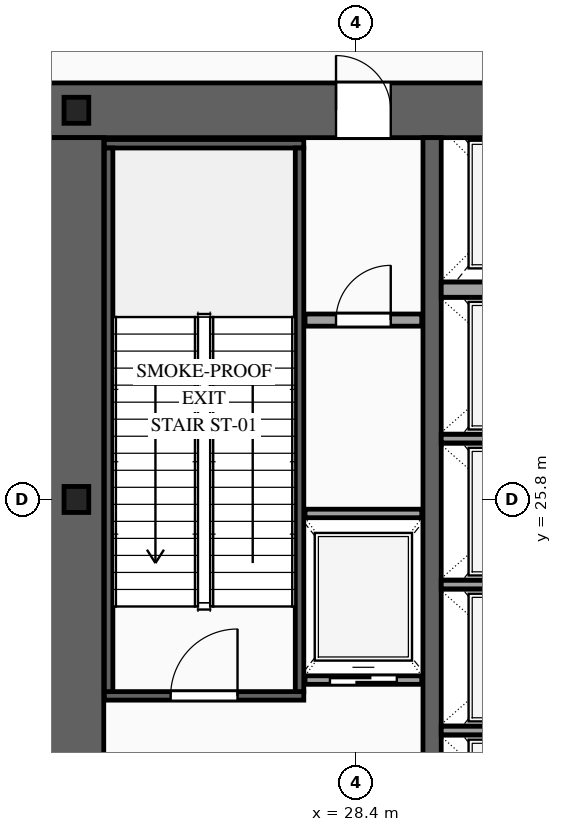
"""IFC4 building model, lengths in metres.
Left out: names, types, materials, properties, quantities, classifications, styles, units other than length and angle.
Written with IfcOpenShell. Run it as: python <this file> out.ifc"""

import sys

from ifc_helpers import new_model, si_unit, direction, frame, frame_2d, origin, origin_2d, place, context, subcontext, project, spatial, rectangle, i_section, extrude, source, transform, mapped, element, fill, save


model = new_model("IFC4")
c1 = context("Model", 3, precision=1e-05, world=origin(), true_north=direction((0.0, 1.0)))
c2 = subcontext(c1, "Body", "Model", "MODEL_VIEW")
j1 = project(units=[si_unit("LENGTHUNIT", "METRE"), si_unit("PLANEANGLEUNIT", "RADIAN")], contexts=[c1])
p1 = place(None, origin())
s1 = spatial("IfcSite", under=j1, at=p1, CompositionType="ELEMENT")
p2 = place(p1, origin())
s2 = spatial("IfcBuilding", under=s1, at=p2, CompositionType="ELEMENT")
p3 = place(p2, frame((0.0, 0.0, 19.8)))
s3 = spatial("IfcBuildingStorey", under=s2, at=p3, CompositionType="ELEMENT", Elevation=19.8)
p4 = place(p3, frame((23.35, 32.2, 0.0), z_axis=(0.0, 0.0, 1.0), x_axis=(1.0, 0.0, 0.0)))
e1 = element("IfcWall", 1, at=p4, inside=s3, PredefinedType="SHEAR", context=c2, shape_type="SweptSolid", body=[
    extrude(rectangle(XDim=27.3, YDim=0.9, at=frame_2d((13.65, 0.0))), origin(), (0.0, 0.0, 1.0), 6.0),
])
p5 = place(p4, frame((4.72, 0.0, 0.0)))
e2 = element("IfcOpeningElement", 2, at=p5, cuts=e1, PredefinedType="OPENING", context=c2, shape_type="SweptSolid", body=[
    extrude(rectangle(XDim=0.9, YDim=2.15, at=frame_2d((0.45, 1.075))), frame((0.0, 0.465, 0.0), z_axis=(0.0, -1.0, 0.0), x_axis=(1.0, 0.0, 0.0)), (0.0, 0.0, 1.0), 0.93),
])
p6 = place(p4, frame((10.0, 0.0, 0.0)))
e3 = element("IfcOpeningElement", 3, at=p6, cuts=e1, PredefinedType="OPENING", context=c2, shape_type="SweptSolid", body=[
    extrude(rectangle(XDim=1.1, YDim=2.2, at=frame_2d((0.55, 1.1))), frame((0.0, 0.465, 0.0), z_axis=(0.0, -1.0, 0.0), x_axis=(1.0, 0.0, 0.0)), (0.0, 0.0, 1.0), 0.93),
])
p7 = place(p4, frame((15.85, 0.0, 0.0)))
e4 = element("IfcOpeningElement", 4, at=p7, cuts=e1, PredefinedType="OPENING", context=c2, shape_type="SweptSolid", body=[
    extrude(rectangle(XDim=1.1, YDim=2.2, at=frame_2d((0.55, 1.1))), frame((0.0, 0.465, 0.0), z_axis=(0.0, -1.0, 0.0), x_axis=(1.0, 0.0, 0.0)), (0.0, 0.0, 1.0), 0.93),
])
p8 = place(p4, frame((19.82, 0.0, 0.0)))
e5 = element("IfcOpeningElement", 5, at=p8, cuts=e1, PredefinedType="OPENING", context=c2, shape_type="SweptSolid", body=[
    extrude(rectangle(XDim=0.9, YDim=2.15, at=frame_2d((0.45, 1.075))), frame((0.0, 0.465, 0.0), z_axis=(0.0, -1.0, 0.0), x_axis=(1.0, 0.0, 0.0)), (0.0, 0.0, 1.0), 0.93),
])
m1 = source(origin(), c2, "Body", "SweptSolid", [
    extrude(rectangle(XDim=11.9, YDim=0.9, at=frame_2d((5.95, 0.0))), origin(), (0.0, 0.0, 1.0), 6.0),
])
p9 = place(p3, frame((23.8, 19.85, 0.0), z_axis=(0.0, 0.0, 1.0), x_axis=(0.0, 1.0, 0.0)))
e6 = element("IfcWall", 6, at=p9, inside=s3, PredefinedType="SHEAR", context=c2, shape_type="MappedRepresentation", body=[
    mapped(m1, transform((0.0, 0.0, 0.0), scale=1.0)),
])
m2 = source(origin(), c2, "Body", "SweptSolid", [
    extrude(rectangle(XDim=11.9, YDim=0.3, at=frame_2d((5.95, 0.0))), origin(), (0.0, 0.0, 1.0), 6.0),
])
p10 = place(p3, frame((29.65, 19.85, 0.0), z_axis=(0.0, 0.0, 1.0), x_axis=(0.0, 1.0, 0.0)))
e7 = element("IfcWall", 7, at=p10, inside=s3, PredefinedType="SOLIDWALL", context=c2, shape_type="MappedRepresentation", body=[
    mapped(m2, transform((0.0, 0.0, 0.0), scale=1.0)),
])
m3 = source(origin(), c2, "Body", "SweptSolid", [
    extrude(i_section(OverallWidth=0.407, OverallDepth=0.428, WebThickness=0.02, FlangeThickness=0.035, at=origin_2d()), origin(), (0.0, 0.0, 1.0), 6.0),
])
for number, where, z_axis, x_axis in (
    (8, (23.8, 25.8, 0.0), (0.0, 0.0, 1.0), (1.0, 0.0, 0.0)),
    (9, (23.8, 32.2, 0.0), (0.0, 0.0, 1.0), (1.0, 0.0, 0.0)),
):
    element("IfcColumn", number, at=place(p3, frame(where, z_axis=z_axis, x_axis=x_axis)), inside=s3, PredefinedType="COLUMN", context=c2, shape_type="MappedRepresentation", body=[
        mapped(m3, transform((0.0, 0.0, 0.0), scale=1.0)),
    ])
p11 = place(p3, frame((27.56, 22.83, 0.0), z_axis=(0.0, 0.0, 1.0), x_axis=(1.0, 0.0, 0.0)))
e10 = element("IfcWall", 10, at=p11, inside=s3, PredefinedType="SOLIDWALL", context=c2, shape_type="SweptSolid", body=[
    extrude(rectangle(XDim=1.92, YDim=0.14, at=frame_2d((0.96, 0.0))), origin(), (0.0, 0.0, 1.0), 5.68),
])
p12 = place(p11, frame((0.41, 0.0, 0.0)))
e11 = element("IfcOpeningElement", 11, at=p12, cuts=e10, PredefinedType="OPENING", context=c2, shape_type="SweptSolid", body=[
    extrude(rectangle(XDim=1.1, YDim=2.2, at=frame_2d((0.55, 1.1))), frame((0.0, 0.085, 0.0), z_axis=(0.0, -1.0, 0.0), x_axis=(1.0, 0.0, 0.0)), (0.0, 0.0, 1.0), 0.17),
])
m4 = source(origin(), c2, "Body", "SweptSolid", [
    extrude(rectangle(XDim=1.92, YDim=0.14, at=frame_2d((0.96, 0.0))), origin(), (0.0, 0.0, 1.0), 5.68),
])
p13 = place(p3, frame((27.56, 25.57, 0.0), z_axis=(0.0, 0.0, 1.0), x_axis=(1.0, 0.0, 0.0)))
e12 = element("IfcWall", 12, at=p13, inside=s3, PredefinedType="SOLIDWALL", context=c2, shape_type="MappedRepresentation", body=[
    mapped(m4, transform((0.0, 0.0, 0.0), scale=1.0)),
])
m5 = source(origin(), c2, "Body", "SweptSolid", [
    extrude(rectangle(XDim=2.5, YDim=0.14, at=frame_2d((1.25, 0.0))), origin(), (0.0, 0.0, 1.0), 5.68),
])
for number, where, z_axis, x_axis in (
    (13, (29.8, 22.0, 0.0), (0.0, 0.0, 1.0), (1.0, 0.0, 0.0)),
    (14, (29.8, 24.4, 0.0), (0.0, 0.0, 1.0), (1.0, 0.0, 0.0)),
    (15, (29.8, 26.8, 0.0), (0.0, 0.0, 1.0), (1.0, 0.0, 0.0)),
):
    element("IfcWall", number, at=place(p3, frame(where, z_axis=z_axis, x_axis=x_axis)), inside=s3, PredefinedType="SOLIDWALL", context=c2, shape_type="MappedRepresentation", body=[
        mapped(m5, transform((0.0, 0.0, 0.0), scale=1.0)),
    ])
m6 = source(origin(), c2, "Body", "SweptSolid", [
    extrude(rectangle(XDim=2.5, YDim=0.25, at=frame_2d((1.25, 0.0))), origin(), (0.0, 0.0, 1.0), 5.68),
])
p14 = place(p3, frame((29.8, 29.25, 0.0), z_axis=(0.0, 0.0, 1.0), x_axis=(1.0, 0.0, 0.0)))
e16 = element("IfcWall", 16, at=p14, inside=s3, PredefinedType="SOLIDWALL", context=c2, shape_type="MappedRepresentation", body=[
    mapped(m6, transform((0.0, 0.0, 0.0), scale=1.0)),
])
p15 = place(p3, frame((24.26, 22.57, 0.0), z_axis=(0.0, 0.0, 1.0), x_axis=(1.0, 0.0, 0.0)))
e17 = element("IfcWall", 17, at=p15, inside=s3, PredefinedType="SOLIDWALL", context=c2, shape_type="SweptSolid", body=[
    extrude(rectangle(XDim=3.28, YDim=0.14, at=frame_2d((1.64, 0.0))), origin(), (0.0, 0.0, 1.0), 5.68),
])
p16 = place(p15, frame((1.09, 0.0, 0.0)))
e18 = element("IfcOpeningElement", 18, at=p16, cuts=e17, PredefinedType="OPENING", context=c2, shape_type="SweptSolid", body=[
    extrude(rectangle(XDim=1.1, YDim=2.2, at=frame_2d((0.55, 1.1))), frame((0.0, 0.085, 0.0), z_axis=(0.0, -1.0, 0.0), x_axis=(1.0, 0.0, 0.0)), (0.0, 0.0, 1.0), 0.17),
])
m7 = source(origin(), c2, "Body", "SweptSolid", [
    extrude(rectangle(XDim=3.28, YDim=0.14, at=frame_2d((1.64, 0.0))), origin(), (0.0, 0.0, 1.0), 5.68),
])
p17 = place(p3, frame((24.26, 31.65, 0.0), z_axis=(0.0, 0.0, 1.0), x_axis=(1.0, 0.0, 0.0)))
e19 = element("IfcWall", 19, at=p17, inside=s3, PredefinedType="SOLIDWALL", context=c2, shape_type="MappedRepresentation", body=[
    mapped(m7, transform((0.0, 0.0, 0.0), scale=1.0)),
])
m8 = source(origin(), c2, "Body", "SweptSolid", [
    extrude(rectangle(XDim=8.94, YDim=0.14, at=frame_2d((4.47, 0.0))), origin(), (0.0, 0.0, 1.0), 5.68),
])
for number, where, z_axis, x_axis in (
    (20, (24.33, 22.64, 0.0), (0.0, 0.0, 1.0), (0.0, 1.0, 0.0)),
    (21, (27.47, 22.64, 0.0), (0.0, 0.0, 1.0), (0.0, 1.0, 0.0)),
):
    element("IfcWall", number, at=place(p3, frame(where, z_axis=z_axis, x_axis=x_axis)), inside=s3, PredefinedType="SOLIDWALL", context=c2, shape_type="MappedRepresentation", body=[
        mapped(m8, transform((0.0, 0.0, 0.0), scale=1.0)),
    ])
p18 = place(p3, frame((27.56, 28.75, 0.0), z_axis=(0.0, 0.0, 1.0), x_axis=(1.0, 0.0, 0.0)))
e22 = element("IfcWall", 22, at=p18, inside=s3, PredefinedType="PARTITIONING", context=c2, shape_type="SweptSolid", body=[
    extrude(rectangle(XDim=1.92, YDim=0.2, at=frame_2d((0.96, 0.0))), origin(), (0.0, 0.0, 1.0), 5.68),
])
p19 = place(p18, frame((0.51, 0.0, 0.0)))
e23 = element("IfcOpeningElement", 23, at=p19, cuts=e22, PredefinedType="OPENING", context=c2, shape_type="SweptSolid", body=[
    extrude(rectangle(XDim=0.9, YDim=2.15, at=frame_2d((0.45, 1.075))), frame((0.0, 0.115, 0.0), z_axis=(0.0, -1.0, 0.0), x_axis=(1.0, 0.0, 0.0)), (0.0, 0.0, 1.0), 0.23),
])
m9 = source(origin(), c2, "Body", "SweptSolid", [
    extrude(rectangle(XDim=1.1, YDim=2.2, at=frame_2d((0.55, 1.1))), frame((0.0, 0.025, 0.0), z_axis=(0.0, -1.0, 0.0), x_axis=(1.0, 0.0, 0.0)), (0.0, 0.0, 1.0), 0.05),
])
p20 = place(p12, origin())
e24 = element("IfcDoor", 24, at=p20, inside=s3, OperationType="SLIDING_TO_LEFT", PredefinedType="DOOR", context=c2, shape_type="MappedRepresentation", body=[
    mapped(m9, transform((0.0, 0.0, 0.0), scale=1.0)),
])
fill(e11, e24)
m10 = source(origin(), c2, "Body", "SweptSolid", [
    extrude(rectangle(XDim=1.1, YDim=2.2, at=frame_2d((0.55, 1.1))), frame((0.0, 0.025, 0.0), z_axis=(0.0, -1.0, 0.0), x_axis=(1.0, 0.0, 0.0)), (0.0, 0.0, 1.0), 0.05),
])
p21 = place(p16, origin())
e25 = element("IfcDoor", 25, at=p21, inside=s3, OperationType="SINGLE_SWING_RIGHT", PredefinedType="DOOR", context=c2, shape_type="MappedRepresentation", body=[
    mapped(m10, transform((0.0, 0.0, 0.0), scale=1.0)),
])
fill(e18, e25)
m11 = source(origin(), c2, "Body", "SweptSolid", [
    extrude(rectangle(XDim=0.9, YDim=2.15, at=frame_2d((0.45, 1.075))), frame((0.0, 0.025, 0.0), z_axis=(0.0, -1.0, 0.0), x_axis=(1.0, 0.0, 0.0)), (0.0, 0.0, 1.0), 0.05),
])
p22 = place(p5, origin())
e26 = element("IfcDoor", 26, at=p22, inside=s3, OperationType="SINGLE_SWING_LEFT", PredefinedType="DOOR", context=c2, shape_type="MappedRepresentation", body=[
    mapped(m11, transform((0.0, 0.0, 0.0), scale=1.0)),
])
fill(e2, e26)
p23 = place(p19, origin())
e27 = element("IfcDoor", 27, at=p23, inside=s3, OperationType="SINGLE_SWING_RIGHT", PredefinedType="DOOR", context=c2, shape_type="MappedRepresentation", body=[
    mapped(m11, transform((0.0, 0.0, 0.0), scale=1.0)),
])
fill(e23, e27)
save(model, sys.argv[1])
